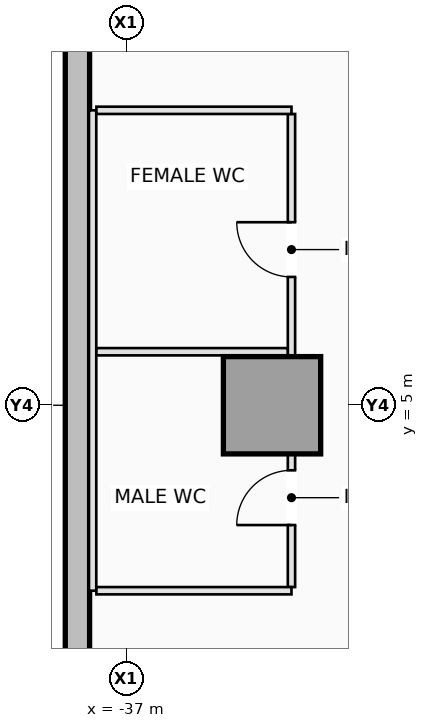
"""IFC4 building model, lengths in metres.
Left out: names, types, materials, properties, quantities, classifications, styles, units other than length and angle.
Written with IfcOpenShell. Run it as: python <this file> out.ifc"""

import sys

from ifc_helpers import new_model, si_unit, direction, frame, frame_2d, origin, origin_2d, place, context, subcontext, project, spatial, rectangle, extrude, element, fill, save


model = new_model("IFC4")
c1 = context("Model", 3, precision=1e-05, world=origin(), true_north=direction((0.0, 1.0)))
c2 = subcontext(c1, "Body", "Model", "MODEL_VIEW")
j1 = project(units=[si_unit("LENGTHUNIT", "METRE"), si_unit("PLANEANGLEUNIT", "RADIAN")], contexts=[c1])
p1 = place(None, origin())
s1 = spatial("IfcSite", under=j1, at=p1, CompositionType="ELEMENT")
p2 = place(p1, origin())
s2 = spatial("IfcBuilding", under=s1, at=p2, CompositionType="ELEMENT")
p3 = place(p2, frame((0.0, 0.0, -5.0)))
s3 = spatial("IfcBuildingStorey", under=s2, at=p3, CompositionType="ELEMENT", Elevation=-5.0)
p4 = place(p3, frame((-37.8, -25.817, 0.0), z_axis=(0.0, 0.0, 1.0), x_axis=(0.0, 1.0, 0.0)))
e1 = element("IfcWall", 1, at=p4, inside=s3, PredefinedType="USERDEFINED", context=c2, shape_type="SweptSolid", body=[
    extrude(rectangle(XDim=51.434, YDim=0.4, at=frame_2d((25.717, 0.0))), origin(), (0.0, 0.0, 1.0), 5.0),
])
p5 = place(p3, frame((-34.6, 5.0, 0.0), z_axis=(0.0, 0.0, 1.0), x_axis=(1.0, 0.0, 0.0)))
e2 = element("IfcColumn", 2, at=p5, inside=s3, PredefinedType="COLUMN", context=c2, shape_type="SweptSolid", body=[
    extrude(rectangle(XDim=1.6, YDim=1.6, at=origin_2d()), origin(), (0.0, 0.0, 1.0), 5.0),
])
p6 = place(p3, frame((-37.55, 1.95, 0.0), z_axis=(0.0, 0.0, 1.0), x_axis=(0.0, 1.0, 0.0)))
e3 = element("IfcWall", 3, at=p6, inside=s3, PredefinedType="PARTITIONING", context=c2, shape_type="SweptSolid", body=[
    extrude(rectangle(XDim=7.9, YDim=0.12, at=frame_2d((3.95, 0.0))), origin(), (0.0, 0.0, 1.0), 4.7),
])
p7 = place(p3, frame((-34.28, 2.01, 0.0), z_axis=(0.0, 0.0, 1.0), x_axis=(0.0, 1.0, 0.0)))
e4 = element("IfcWall", 4, at=p7, inside=s3, PredefinedType="PARTITIONING", context=c2, shape_type="SweptSolid", body=[
    extrude(rectangle(XDim=2.188, YDim=0.12, at=frame_2d((1.094, 0.0))), origin(), (0.0, 0.0, 1.0), 4.7),
])
p8 = place(p7, frame((1.02, 0.0, 0.0)))
e5 = element("IfcOpeningElement", 5, at=p8, cuts=e4, PredefinedType="OPENING", context=c2, shape_type="SweptSolid", body=[
    extrude(rectangle(XDim=0.9, YDim=2.12, at=frame_2d((0.45, 1.06))), frame((0.0, 0.07, 0.0), z_axis=(0.0, -1.0, 0.0), x_axis=(1.0, 0.0, 0.0)), (0.0, 0.0, 1.0), 0.14),
])
p9 = place(p3, frame((-34.28, 5.802, 0.0), z_axis=(0.0, 0.0, 1.0), x_axis=(0.0, 1.0, 0.0)))
e6 = element("IfcWall", 6, at=p9, inside=s3, PredefinedType="PARTITIONING", context=c2, shape_type="SweptSolid", body=[
    extrude(rectangle(XDim=3.988, YDim=0.12, at=frame_2d((1.994, 0.0))), origin(), (0.0, 0.0, 1.0), 4.7),
])
p10 = place(p9, frame((1.308, 0.0, 0.0)))
e7 = element("IfcOpeningElement", 7, at=p10, cuts=e6, PredefinedType="OPENING", context=c2, shape_type="SweptSolid", body=[
    extrude(rectangle(XDim=0.9, YDim=2.12, at=frame_2d((0.45, 1.06))), frame((0.0, 0.07, 0.0), z_axis=(0.0, -1.0, 0.0), x_axis=(1.0, 0.0, 0.0)), (0.0, 0.0, 1.0), 0.14),
])
p11 = place(p3, frame((-37.488, 5.88, 0.0), z_axis=(0.0, 0.0, 1.0), x_axis=(1.0, 0.0, 0.0)))
e8 = element("IfcWall", 8, at=p11, inside=s3, PredefinedType="PARTITIONING", context=c2, shape_type="SweptSolid", body=[
    extrude(rectangle(XDim=3.146, YDim=0.12, at=frame_2d((1.573, 0.0))), origin(), (0.0, 0.0, 1.0), 4.7),
])
for number, where, z_axis, x_axis in (
    (9, (-37.488, 1.95, 0.0), (0.0, 0.0, 1.0), (1.0, 0.0, 0.0)),
    (10, (-37.488, 9.85, 0.0), (0.0, 0.0, 1.0), (1.0, 0.0, 0.0)),
):
    element("IfcWall", number, at=place(p3, frame(where, z_axis=z_axis, x_axis=x_axis)), inside=s3, PredefinedType="PARTITIONING", context=c2, shape_type="SweptSolid", body=[
        extrude(rectangle(XDim=3.208, YDim=0.12, at=frame_2d((1.604, 0.0))), origin(), (0.0, 0.0, 1.0), 4.7),
    ])
p12 = place(p8, origin())
e11 = element("IfcDoor", 11, at=p12, inside=s3, OperationType="SINGLE_SWING_LEFT", PredefinedType="DOOR", context=c2, shape_type="SweptSolid", body=[
    extrude(rectangle(XDim=0.9, YDim=2.12, at=frame_2d((0.45, 1.06))), frame((0.0, 0.025, 0.0), z_axis=(0.0, -1.0, 0.0), x_axis=(1.0, 0.0, 0.0)), (0.0, 0.0, 1.0), 0.05),
])
fill(e5, e11)
p13 = place(p10, origin())
e12 = element("IfcDoor", 12, at=p13, inside=s3, OperationType="SINGLE_SWING_RIGHT", PredefinedType="DOOR", context=c2, shape_type="SweptSolid", body=[
    extrude(rectangle(XDim=0.9, YDim=2.12, at=frame_2d((0.45, 1.06))), frame((0.0, 0.025, 0.0), z_axis=(0.0, -1.0, 0.0), x_axis=(1.0, 0.0, 0.0)), (0.0, 0.0, 1.0), 0.05),
])
fill(e7, e12)
save(model, sys.argv[1])
